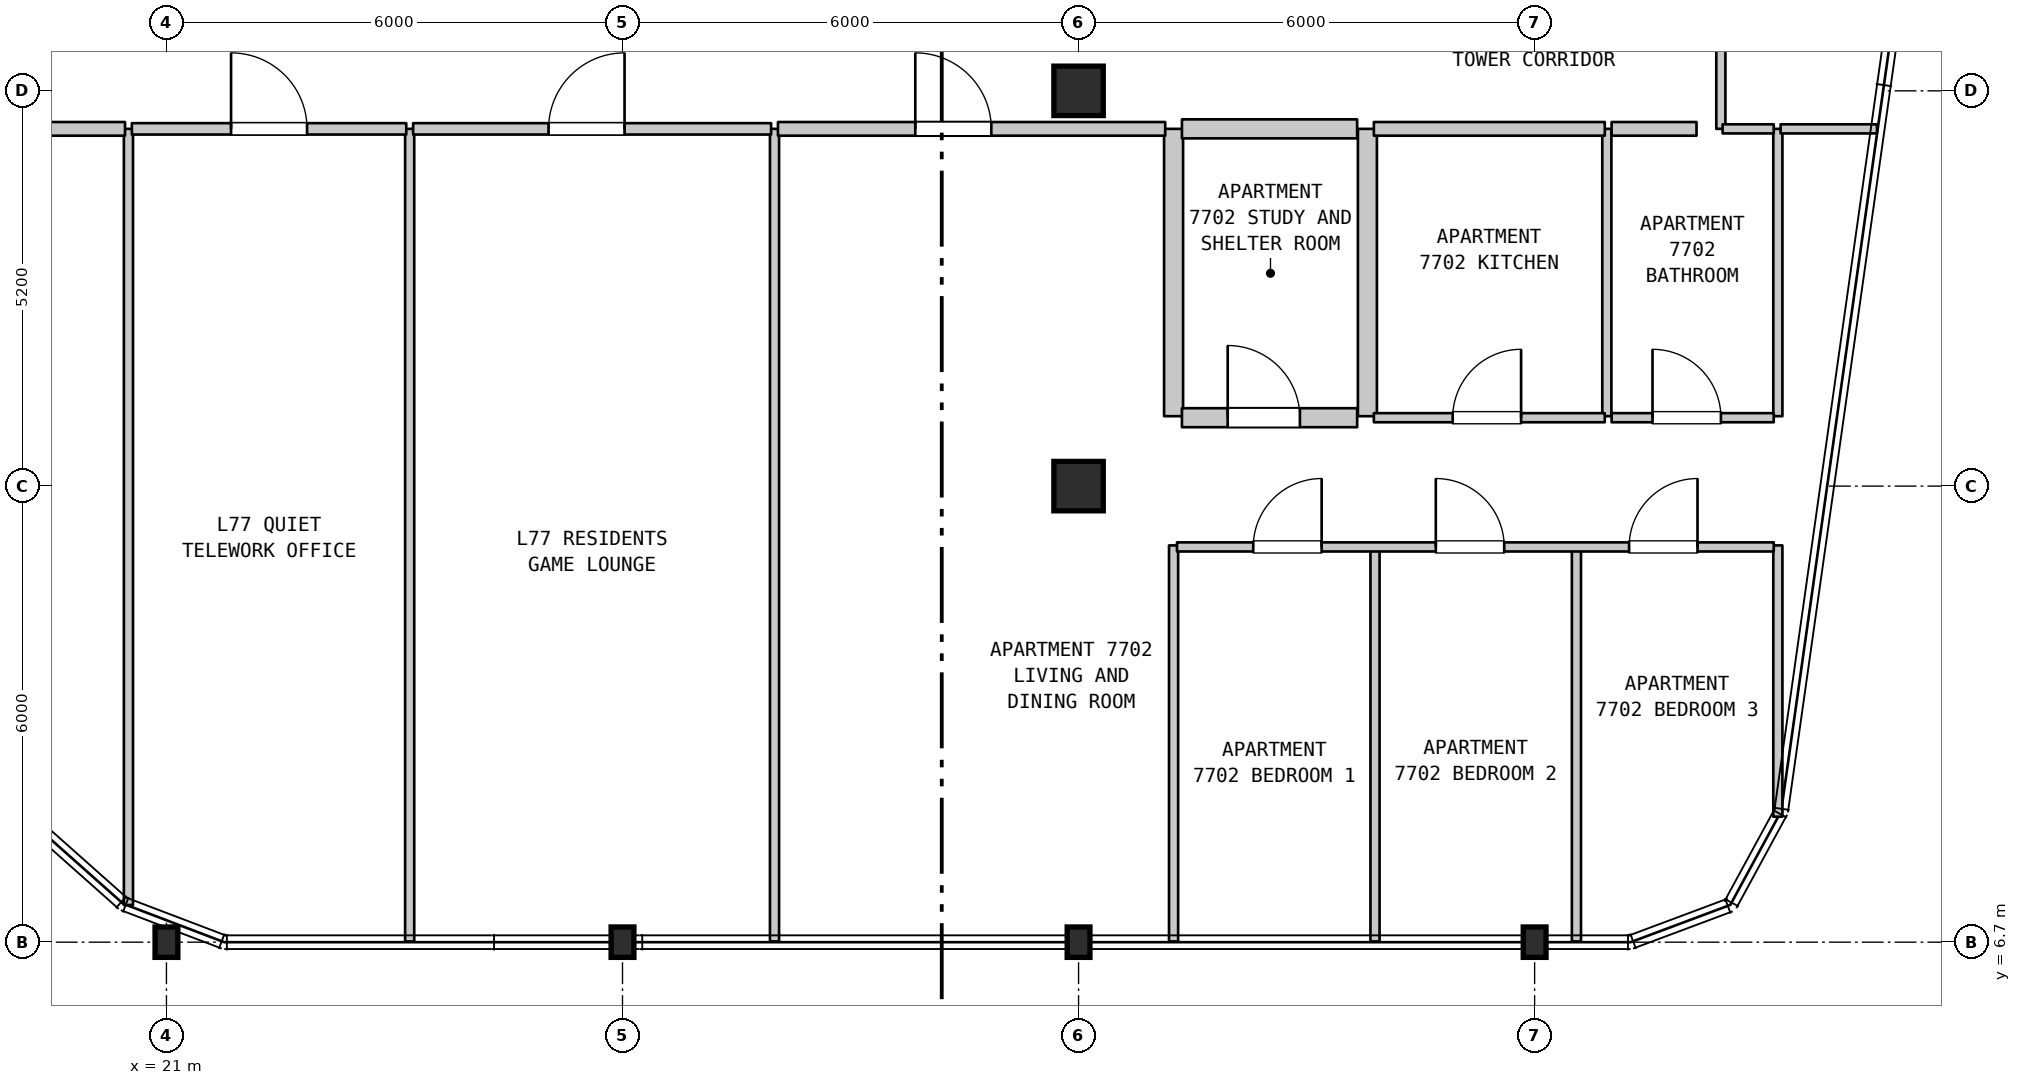
"""IFC4 building model, lengths in metres.
Left out: names, types, materials, properties, quantities, classifications, styles, units other than length and angle.
Written with IfcOpenShell. Run it as: python <this file> out.ifc"""

import sys

from ifc_helpers import new_model, si_unit, direction, frame, frame_2d, origin, origin_2d, place, context, subcontext, project, spatial, rectangle, i_section, extrude, element, fill, save


model = new_model("IFC4")
c1 = context("Model", 3, precision=1e-05, world=origin(), true_north=direction((0.0, 1.0)))
c2 = subcontext(c1, "Body", "Model", "MODEL_VIEW")
j1 = project(units=[si_unit("LENGTHUNIT", "METRE"), si_unit("PLANEANGLEUNIT", "RADIAN")], contexts=[c1])
p1 = place(None, origin())
s1 = spatial("IfcSite", under=j1, at=p1, CompositionType="ELEMENT")
p2 = place(p1, origin())
s2 = spatial("IfcBuilding", under=s1, at=p2, CompositionType="ELEMENT")
p3 = place(p2, frame((0.0, 0.0, 307.3)))
s3 = spatial("IfcBuildingStorey", under=s2, at=p3, CompositionType="ELEMENT", Elevation=307.3)
for number, where, z_axis, x_axis in (
    (1, (21.0, 6.7, 0.0), (0.0, 0.0, 1.0), (1.0, 0.0, 0.0)),
    (2, (27.0, 6.7, 0.0), (0.0, 0.0, 1.0), (1.0, 0.0, 0.0)),
    (3, (33.0, 6.7, 0.0), (0.0, 0.0, 1.0), (1.0, 0.0, 0.0)),
):
    element("IfcColumn", number, at=place(p3, frame(where, z_axis=z_axis, x_axis=x_axis)), inside=s3, PredefinedType="COLUMN", context=c2, shape_type="SweptSolid", body=[
        extrude(i_section(OverallWidth=0.3, OverallDepth=0.4, WebThickness=0.013, FlangeThickness=0.024, FilletRadius=0.027, at=origin_2d()), origin(), (0.0, 0.0, 1.0), 3.7),
    ])
for number, where, z_axis, x_axis in (
    (4, (33.0, 12.7, 0.0), (0.0, 0.0, 1.0), (1.0, 0.0, 0.0)),
    (5, (33.0, 17.9, 0.0), (0.0, 0.0, 1.0), (1.0, 0.0, 0.0)),
):
    element("IfcColumn", number, at=place(p3, frame(where, z_axis=z_axis, x_axis=x_axis)), inside=s3, PredefinedType="COLUMN", context=c2, shape_type="SweptSolid", body=[
        extrude(rectangle(XDim=0.65, YDim=0.65, at=origin_2d()), origin(), (0.0, 0.0, 1.0), 3.7),
    ])
p4 = place(p3, frame((39.0, 6.7, 0.0), z_axis=(0.0, 0.0, 1.0), x_axis=(1.0, 0.0, 0.0)))
e6 = element("IfcColumn", 6, at=p4, inside=s3, PredefinedType="COLUMN", context=c2, shape_type="SweptSolid", body=[
    extrude(i_section(OverallWidth=0.3, OverallDepth=0.4, WebThickness=0.013, FlangeThickness=0.024, FilletRadius=0.027, at=origin_2d()), origin(), (0.0, 0.0, 1.0), 3.7),
])
p5 = place(p3, frame((20.5, 7.189, 0.0), z_axis=(0.0, 0.0, 1.0), x_axis=(0.0, 1.0, 0.0)))
e7 = element("IfcWall", 7, at=p5, inside=s3, PredefinedType="PARTITIONING", context=c2, shape_type="SweptSolid", body=[
    extrude(rectangle(XDim=10.211, YDim=0.12, at=frame_2d((5.105, 0.0))), origin(), (0.0, 0.0, 1.0), 3.39),
])
for number, where, z_axis, x_axis in (
    (8, (24.2, 6.71, 0.0), (0.0, 0.0, 1.0), (0.0, 1.0, 0.0)),
    (9, (29.0, 6.71, 0.0), (0.0, 0.0, 1.0), (0.0, 1.0, 0.0)),
):
    element("IfcWall", number, at=place(p3, frame(where, z_axis=z_axis, x_axis=x_axis)), inside=s3, PredefinedType="PARTITIONING", context=c2, shape_type="SweptSolid", body=[
        extrude(rectangle(XDim=10.69, YDim=0.12, at=frame_2d((5.345, 0.0))), origin(), (0.0, 0.0, 1.0), 3.39),
    ])
p6 = place(p3, frame((34.25, 6.71, 0.0), z_axis=(0.0, 0.0, 1.0), x_axis=(0.0, 1.0, 0.0)))
e10 = element("IfcWall", 10, at=p6, inside=s3, PredefinedType="PARTITIONING", context=c2, shape_type="SweptSolid", body=[
    extrude(rectangle(XDim=5.21, YDim=0.12, at=frame_2d((2.605, 0.0))), origin(), (0.0, 0.0, 1.0), 3.39),
])
for number, where, z_axis, x_axis in (
    (11, (34.25, 13.62, 0.0), (0.0, 0.0, 1.0), (0.0, 1.0, 0.0)),
    (12, (36.8, 13.62, 0.0), (0.0, 0.0, 1.0), (0.0, 1.0, 0.0)),
):
    element("IfcWall", number, at=place(p3, frame(where, z_axis=z_axis, x_axis=x_axis)), inside=s3, PredefinedType="STANDARD", context=c2, shape_type="SweptSolid", body=[
        extrude(rectangle(XDim=3.78, YDim=0.25, at=frame_2d((1.89, 0.0))), origin(), (0.0, 0.0, 1.0), 3.39),
    ])
for number, where, z_axis, x_axis in (
    (13, (36.9, 6.71, 0.0), (0.0, 0.0, 1.0), (0.0, 1.0, 0.0)),
    (14, (39.55, 6.71, 0.0), (0.0, 0.0, 1.0), (0.0, 1.0, 0.0)),
):
    element("IfcWall", number, at=place(p3, frame(where, z_axis=z_axis, x_axis=x_axis)), inside=s3, PredefinedType="PARTITIONING", context=c2, shape_type="SweptSolid", body=[
        extrude(rectangle(XDim=5.21, YDim=0.12, at=frame_2d((2.605, 0.0))), origin(), (0.0, 0.0, 1.0), 3.39),
    ])
p7 = place(p3, frame((39.95, 13.62, 0.0), z_axis=(0.0, 0.0, 1.0), x_axis=(0.0, 1.0, 0.0)))
e15 = element("IfcWall", 15, at=p7, inside=s3, PredefinedType="PARTITIONING", context=c2, shape_type="SweptSolid", body=[
    extrude(rectangle(XDim=3.78, YDim=0.12, at=frame_2d((1.89, 0.0))), origin(), (0.0, 0.0, 1.0), 3.39),
])
p8 = place(p3, frame((41.45, 17.4, 0.0), z_axis=(0.0, 0.0, 1.0), x_axis=(0.0, 1.0, 0.0)))
e16 = element("IfcWall", 16, at=p8, inside=s3, PredefinedType="PARTITIONING", context=c2, shape_type="SweptSolid", body=[
    extrude(rectangle(XDim=2.099, YDim=0.12, at=frame_2d((1.05, 0.0))), origin(), (0.0, 0.0, 1.0), 3.39),
])
p9 = place(p3, frame((42.2, 8.351, 0.0), z_axis=(0.0, 0.0, 1.0), x_axis=(0.0, 1.0, 0.0)))
e17 = element("IfcWall", 17, at=p9, inside=s3, PredefinedType="PARTITIONING", context=c2, shape_type="SweptSolid", body=[
    extrude(rectangle(XDim=3.569, YDim=0.12, at=frame_2d((1.784, 0.0))), origin(), (0.0, 0.0, 1.0), 3.39),
])
p10 = place(p3, frame((42.2, 13.62, 0.0), z_axis=(0.0, 0.0, 1.0), x_axis=(0.0, 1.0, 0.0)))
e18 = element("IfcWall", 18, at=p10, inside=s3, PredefinedType="PARTITIONING", context=c2, shape_type="SweptSolid", body=[
    extrude(rectangle(XDim=3.78, YDim=0.12, at=frame_2d((1.89, 0.0))), origin(), (0.0, 0.0, 1.0), 3.39),
])
p11 = place(p3, frame((34.295, 11.9, 0.0), z_axis=(0.0, 0.0, 1.0), x_axis=(1.0, 0.0, 0.0)))
e19 = element("IfcWall", 19, at=p11, inside=s3, PredefinedType="PARTITIONING", context=c2, shape_type="SweptSolid", body=[
    extrude(rectangle(XDim=7.851, YDim=0.12, at=frame_2d((3.926, 0.0))), origin(), (0.0, 0.0, 1.0), 3.39),
])
p12 = place(p11, frame((1.003, 0.0, 0.0)))
e20 = element("IfcOpeningElement", 20, at=p12, cuts=e19, PredefinedType="OPENING", context=c2, shape_type="SweptSolid", body=[
    extrude(rectangle(XDim=0.9, YDim=2.15, at=frame_2d((0.45, 1.075))), frame((0.0, 0.07, 0.0), z_axis=(0.0, -1.0, 0.0), x_axis=(1.0, 0.0, 0.0)), (0.0, 0.0, 1.0), 0.14),
])
p13 = place(p11, frame((3.405, 0.0, 0.0)))
e21 = element("IfcOpeningElement", 21, at=p13, cuts=e19, PredefinedType="OPENING", context=c2, shape_type="SweptSolid", body=[
    extrude(rectangle(XDim=0.9, YDim=2.15, at=frame_2d((0.45, 1.075))), frame((0.0, 0.07, 0.0), z_axis=(0.0, -1.0, 0.0), x_axis=(1.0, 0.0, 0.0)), (0.0, 0.0, 1.0), 0.14),
])
p14 = place(p11, frame((5.948, 0.0, 0.0)))
e22 = element("IfcOpeningElement", 22, at=p14, cuts=e19, PredefinedType="OPENING", context=c2, shape_type="SweptSolid", body=[
    extrude(rectangle(XDim=0.9, YDim=2.15, at=frame_2d((0.45, 1.075))), frame((0.0, 0.07, 0.0), z_axis=(0.0, -1.0, 0.0), x_axis=(1.0, 0.0, 0.0)), (0.0, 0.0, 1.0), 0.14),
])
p15 = place(p3, frame((34.36, 13.6, 0.0), z_axis=(0.0, 0.0, 1.0), x_axis=(1.0, 0.0, 0.0)))
e23 = element("IfcWall", 23, at=p15, inside=s3, PredefinedType="STANDARD", context=c2, shape_type="SweptSolid", body=[
    extrude(rectangle(XDim=2.305, YDim=0.25, at=frame_2d((1.152, 0.0))), origin(), (0.0, 0.0, 1.0), 3.39),
])
p16 = place(p15, frame((0.602, 0.0, 0.0)))
e24 = element("IfcOpeningElement", 24, at=p16, cuts=e23, PredefinedType="OPENING", context=c2, shape_type="SweptSolid", body=[
    extrude(rectangle(XDim=0.95, YDim=2.15, at=frame_2d((0.475, 1.075))), frame((0.0, 0.135, 0.0), z_axis=(0.0, -1.0, 0.0), x_axis=(1.0, 0.0, 0.0)), (0.0, 0.0, 1.0), 0.27),
])
p17 = place(p3, frame((36.885, 13.6, 0.0), z_axis=(0.0, 0.0, 1.0), x_axis=(1.0, 0.0, 0.0)))
e25 = element("IfcWall", 25, at=p17, inside=s3, PredefinedType="PARTITIONING", context=c2, shape_type="SweptSolid", body=[
    extrude(rectangle(XDim=3.038, YDim=0.12, at=frame_2d((1.519, 0.0))), origin(), (0.0, 0.0, 1.0), 3.39),
])
p18 = place(p17, frame((1.037, 0.0, 0.0)))
e26 = element("IfcOpeningElement", 26, at=p18, cuts=e25, PredefinedType="OPENING", context=c2, shape_type="SweptSolid", body=[
    extrude(rectangle(XDim=0.9, YDim=2.15, at=frame_2d((0.45, 1.075))), frame((0.0, 0.07, 0.0), z_axis=(0.0, -1.0, 0.0), x_axis=(1.0, 0.0, 0.0)), (0.0, 0.0, 1.0), 0.14),
])
p19 = place(p3, frame((40.013, 13.6, 0.0), z_axis=(0.0, 0.0, 1.0), x_axis=(1.0, 0.0, 0.0)))
e27 = element("IfcWall", 27, at=p19, inside=s3, PredefinedType="PARTITIONING", context=c2, shape_type="SweptSolid", body=[
    extrude(rectangle(XDim=2.133, YDim=0.12, at=frame_2d((1.066, 0.0))), origin(), (0.0, 0.0, 1.0), 3.39),
])
p20 = place(p19, frame((0.538, 0.0, 0.0)))
e28 = element("IfcOpeningElement", 28, at=p20, cuts=e27, PredefinedType="OPENING", context=c2, shape_type="SweptSolid", body=[
    extrude(rectangle(XDim=0.9, YDim=2.1, at=frame_2d((0.45, 1.05))), frame((0.0, 0.07, 0.0), z_axis=(0.0, -1.0, 0.0), x_axis=(1.0, 0.0, 0.0)), (0.0, 0.0, 1.0), 0.14),
])
p21 = place(p3, frame((18.595, 17.4, 0.0), z_axis=(0.0, 0.0, 1.0), x_axis=(1.0, 0.0, 0.0)))
e29 = element("IfcWall", 29, at=p21, inside=s3, PredefinedType="STANDARD", context=c2, shape_type="SweptSolid", body=[
    extrude(rectangle(XDim=1.86, YDim=0.18, at=frame_2d((0.93, 0.0))), origin(), (0.0, 0.0, 1.0), 3.39),
])
p22 = place(p3, frame((20.545, 17.4, 0.0), z_axis=(0.0, 0.0, 1.0), x_axis=(1.0, 0.0, 0.0)))
e30 = element("IfcWall", 30, at=p22, inside=s3, PredefinedType="STANDARD", context=c2, shape_type="SweptSolid", body=[
    extrude(rectangle(XDim=3.61, YDim=0.15, at=frame_2d((1.805, 0.0))), origin(), (0.0, 0.0, 1.0), 3.39),
])
p23 = place(p22, frame((1.305, 0.0, 0.0)))
e31 = element("IfcOpeningElement", 31, at=p23, cuts=e30, PredefinedType="OPENING", context=c2, shape_type="SweptSolid", body=[
    extrude(rectangle(XDim=1.0, YDim=2.15, at=frame_2d((0.5, 1.075))), frame((0.0, 0.085, 0.0), z_axis=(0.0, -1.0, 0.0), x_axis=(1.0, 0.0, 0.0)), (0.0, 0.0, 1.0), 0.17),
])
p24 = place(p3, frame((24.245, 17.4, 0.0), z_axis=(0.0, 0.0, 1.0), x_axis=(1.0, 0.0, 0.0)))
e32 = element("IfcWall", 32, at=p24, inside=s3, PredefinedType="STANDARD", context=c2, shape_type="SweptSolid", body=[
    extrude(rectangle(XDim=4.71, YDim=0.15, at=frame_2d((2.355, 0.0))), origin(), (0.0, 0.0, 1.0), 3.39),
])
p25 = place(p24, frame((1.782, 0.0, 0.0)))
e33 = element("IfcOpeningElement", 33, at=p25, cuts=e32, PredefinedType="OPENING", context=c2, shape_type="SweptSolid", body=[
    extrude(rectangle(XDim=1.0, YDim=2.15, at=frame_2d((0.5, 1.075))), frame((0.0, 0.085, 0.0), z_axis=(0.0, -1.0, 0.0), x_axis=(1.0, 0.0, 0.0)), (0.0, 0.0, 1.0), 0.17),
])
p26 = place(p3, frame((29.045, 17.4, 0.0), z_axis=(0.0, 0.0, 1.0), x_axis=(1.0, 0.0, 0.0)))
e34 = element("IfcWall", 34, at=p26, inside=s3, PredefinedType="STANDARD", context=c2, shape_type="SweptSolid", body=[
    extrude(rectangle(XDim=5.095, YDim=0.18, at=frame_2d((2.547, 0.0))), origin(), (0.0, 0.0, 1.0), 3.39),
])
p27 = place(p26, frame((1.807, 0.0, 0.0)))
e35 = element("IfcOpeningElement", 35, at=p27, cuts=e34, PredefinedType="OPENING", context=c2, shape_type="SweptSolid", body=[
    extrude(rectangle(XDim=1.0, YDim=2.15, at=frame_2d((0.5, 1.075))), frame((0.0, 0.1, 0.0), z_axis=(0.0, -1.0, 0.0), x_axis=(1.0, 0.0, 0.0)), (0.0, 0.0, 1.0), 0.2),
])
p28 = place(p3, frame((34.36, 17.4, 0.0), z_axis=(0.0, 0.0, 1.0), x_axis=(1.0, 0.0, 0.0)))
e36 = element("IfcWall", 36, at=p28, inside=s3, PredefinedType="STANDARD", context=c2, shape_type="SweptSolid", body=[
    extrude(rectangle(XDim=2.305, YDim=0.25, at=frame_2d((1.152, 0.0))), origin(), (0.0, 0.0, 1.0), 3.39),
])
p29 = place(p3, frame((36.885, 17.4, 0.0), z_axis=(0.0, 0.0, 1.0), x_axis=(1.0, 0.0, 0.0)))
e37 = element("IfcWall", 37, at=p29, inside=s3, PredefinedType="STANDARD", context=c2, shape_type="SweptSolid", body=[
    extrude(rectangle(XDim=3.038, YDim=0.18, at=frame_2d((1.519, 0.0))), origin(), (0.0, 0.0, 1.0), 3.39),
])
p30 = place(p3, frame((40.013, 17.4, 0.0), z_axis=(0.0, 0.0, 1.0), x_axis=(1.0, 0.0, 0.0)))
e38 = element("IfcWall", 38, at=p30, inside=s3, PredefinedType="STANDARD", context=c2, shape_type="SweptSolid", body=[
    extrude(rectangle(XDim=1.117, YDim=0.18, at=frame_2d((0.559, 0.0))), origin(), (0.0, 0.0, 1.0), 3.39),
])
p31 = place(p3, frame((41.473, 17.4, 0.0), z_axis=(0.0, 0.0, 1.0), x_axis=(1.0, 0.0, 0.0)))
e39 = element("IfcWall", 39, at=p31, inside=s3, PredefinedType="PARTITIONING", context=c2, shape_type="SweptSolid", body=[
    extrude(rectangle(XDim=0.673, YDim=0.12, at=frame_2d((0.336, 0.0))), origin(), (0.0, 0.0, 1.0), 3.39),
])
p32 = place(p3, frame((42.236, 17.4, 0.0), z_axis=(0.0, 0.0, 1.0), x_axis=(1.0, 0.0, 0.0)))
e40 = element("IfcWall", 40, at=p32, inside=s3, PredefinedType="PARTITIONING", context=c2, shape_type="SweptSolid", body=[
    extrude(rectangle(XDim=1.268, YDim=0.12, at=frame_2d((0.634, 0.0))), origin(), (0.0, 0.0, 1.0), 3.39),
])
p33 = place(p12, origin())
e41 = element("IfcDoor", 41, at=p33, inside=s3, OperationType="SINGLE_SWING_RIGHT", PredefinedType="DOOR", context=c2, shape_type="SweptSolid", body=[
    extrude(rectangle(XDim=0.9, YDim=2.15, at=frame_2d((0.45, 1.075))), frame((0.0, 0.025, 0.0), z_axis=(0.0, -1.0, 0.0), x_axis=(1.0, 0.0, 0.0)), (0.0, 0.0, 1.0), 0.05),
])
fill(e20, e41)
p34 = place(p13, origin())
e42 = element("IfcDoor", 42, at=p34, inside=s3, OperationType="SINGLE_SWING_LEFT", PredefinedType="DOOR", context=c2, shape_type="SweptSolid", body=[
    extrude(rectangle(XDim=0.9, YDim=2.15, at=frame_2d((0.45, 1.075))), frame((0.0, 0.025, 0.0), z_axis=(0.0, -1.0, 0.0), x_axis=(1.0, 0.0, 0.0)), (0.0, 0.0, 1.0), 0.05),
])
fill(e21, e42)
p35 = place(p14, origin())
e43 = element("IfcDoor", 43, at=p35, inside=s3, OperationType="SINGLE_SWING_RIGHT", PredefinedType="DOOR", context=c2, shape_type="SweptSolid", body=[
    extrude(rectangle(XDim=0.9, YDim=2.15, at=frame_2d((0.45, 1.075))), frame((0.0, 0.025, 0.0), z_axis=(0.0, -1.0, 0.0), x_axis=(1.0, 0.0, 0.0)), (0.0, 0.0, 1.0), 0.05),
])
fill(e22, e43)
p36 = place(p16, origin())
e44 = element("IfcDoor", 44, at=p36, inside=s3, OperationType="SINGLE_SWING_LEFT", PredefinedType="DOOR", context=c2, shape_type="SweptSolid", body=[
    extrude(rectangle(XDim=0.95, YDim=2.15, at=frame_2d((0.475, 1.075))), frame((0.0, 0.025, 0.0), z_axis=(0.0, -1.0, 0.0), x_axis=(1.0, 0.0, 0.0)), (0.0, 0.0, 1.0), 0.05),
])
fill(e24, e44)
p37 = place(p18, origin())
e45 = element("IfcDoor", 45, at=p37, inside=s3, OperationType="SINGLE_SWING_RIGHT", PredefinedType="DOOR", context=c2, shape_type="SweptSolid", body=[
    extrude(rectangle(XDim=0.9, YDim=2.15, at=frame_2d((0.45, 1.075))), frame((0.0, 0.025, 0.0), z_axis=(0.0, -1.0, 0.0), x_axis=(1.0, 0.0, 0.0)), (0.0, 0.0, 1.0), 0.05),
])
fill(e26, e45)
p38 = place(p20, origin())
e46 = element("IfcDoor", 46, at=p38, inside=s3, OperationType="SINGLE_SWING_LEFT", PredefinedType="DOOR", context=c2, shape_type="SweptSolid", body=[
    extrude(rectangle(XDim=0.9, YDim=2.1, at=frame_2d((0.45, 1.05))), frame((0.0, 0.025, 0.0), z_axis=(0.0, -1.0, 0.0), x_axis=(1.0, 0.0, 0.0)), (0.0, 0.0, 1.0), 0.05),
])
fill(e28, e46)
p39 = place(p23, origin())
e47 = element("IfcDoor", 47, at=p39, inside=s3, OperationType="SINGLE_SWING_LEFT", PredefinedType="DOOR", context=c2, shape_type="SweptSolid", body=[
    extrude(rectangle(XDim=1.0, YDim=2.15, at=frame_2d((0.5, 1.075))), frame((0.0, 0.025, 0.0), z_axis=(0.0, -1.0, 0.0), x_axis=(1.0, 0.0, 0.0)), (0.0, 0.0, 1.0), 0.05),
])
fill(e31, e47)
p40 = place(p25, origin())
e48 = element("IfcDoor", 48, at=p40, inside=s3, OperationType="SINGLE_SWING_RIGHT", PredefinedType="DOOR", context=c2, shape_type="SweptSolid", body=[
    extrude(rectangle(XDim=1.0, YDim=2.15, at=frame_2d((0.5, 1.075))), frame((0.0, 0.025, 0.0), z_axis=(0.0, -1.0, 0.0), x_axis=(1.0, 0.0, 0.0)), (0.0, 0.0, 1.0), 0.05),
])
fill(e33, e48)
p41 = place(p27, origin())
e49 = element("IfcDoor", 49, at=p41, inside=s3, OperationType="SINGLE_SWING_LEFT", PredefinedType="DOOR", context=c2, shape_type="SweptSolid", body=[
    extrude(rectangle(XDim=1.0, YDim=2.15, at=frame_2d((0.5, 1.075))), frame((0.0, 0.025, 0.0), z_axis=(0.0, -1.0, 0.0), x_axis=(1.0, 0.0, 0.0)), (0.0, 0.0, 1.0), 0.05),
])
fill(e35, e49)
save(model, sys.argv[1])
